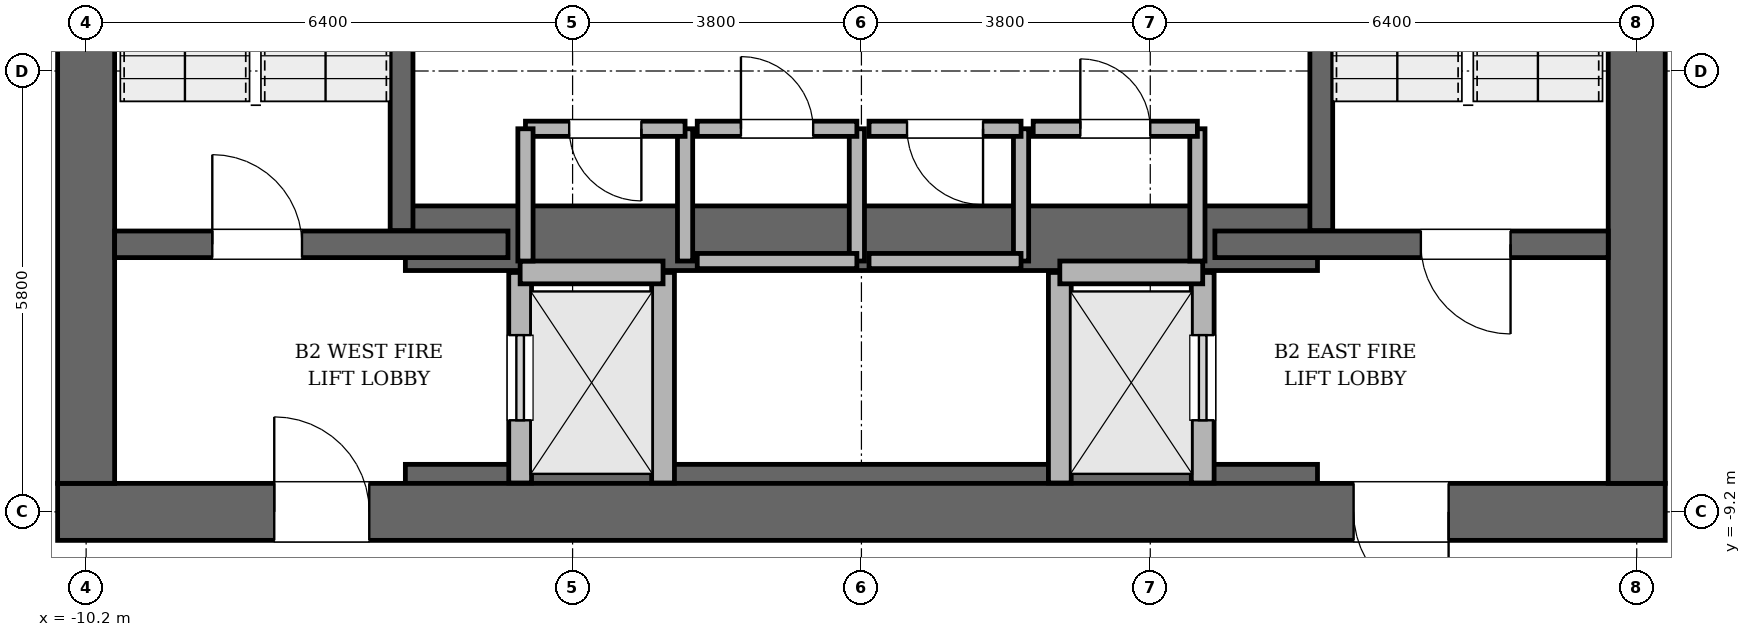
"""IFC4 building model, lengths in metres.
Left out: names, types, materials, properties, quantities, classifications, styles, units other than length and angle.
Written with IfcOpenShell. Run it as: python <this file> out.ifc"""

import sys

from ifc_helpers import new_model, si_unit, direction, frame, frame_2d, origin, place, context, subcontext, project, spatial, rectangle, extrude, element, fill, save


model = new_model("IFC4")
c1 = context("Model", 3, precision=1e-05, world=origin(), true_north=direction((0.0, 1.0)))
c2 = subcontext(c1, "Body", "Model", "MODEL_VIEW")
j1 = project(units=[si_unit("LENGTHUNIT", "METRE"), si_unit("PLANEANGLEUNIT", "RADIAN")], contexts=[c1])
p1 = place(None, origin())
s1 = spatial("IfcSite", under=j1, at=p1, CompositionType="ELEMENT")
p2 = place(p1, origin())
s2 = spatial("IfcBuilding", under=s1, at=p2, CompositionType="ELEMENT")
p3 = place(p2, frame((0.0, 0.0, -9.6)))
s3 = spatial("IfcBuildingStorey", under=s2, at=p3, CompositionType="ELEMENT", Elevation=-9.6)
for number, where, z_axis, x_axis in (
    (1, (-6.0, -9.0, -1.6), (0.0, 0.0, 1.0), (1.0, 0.0, 0.0)),
    (2, (-6.0, -5.6, -1.6), (0.0, 0.0, 1.0), (1.0, 0.0, 0.0)),
):
    element("IfcWall", number, at=place(p3, frame(where, z_axis=z_axis, x_axis=x_axis)), inside=s3, PredefinedType="USERDEFINED", context=c2, shape_type="SweptSolid", body=[
        extrude(rectangle(XDim=12.0, YDim=0.85, at=frame_2d((6.0, 0.0))), origin(), (0.0, 0.0, 1.0), 1.6),
    ])
p4 = place(p3, frame((10.575, -9.2, 0.0), z_axis=(0.0, 0.0, 1.0), x_axis=(-1.0, 0.0, 0.0)))
e3 = element("IfcWall", 3, at=p4, inside=s3, PredefinedType="SHEAR", context=c2, shape_type="SweptSolid", body=[
    extrude(rectangle(XDim=21.15, YDim=0.75, at=frame_2d((10.575, 0.0))), origin(), (0.0, 0.0, 1.0), 4.8),
])
p5 = place(p4, frame((2.85, 0.0, 0.0)))
e4 = element("IfcOpeningElement", 4, at=p5, cuts=e3, PredefinedType="OPENING", context=c2, shape_type="SweptSolid", body=[
    extrude(rectangle(XDim=1.25, YDim=2.25, at=frame_2d((0.625, 1.125))), frame((0.0, 0.385, 0.0), z_axis=(0.0, -1.0, 0.0), x_axis=(1.0, 0.0, 0.0)), (0.0, 0.0, 1.0), 0.77),
])
p6 = place(p4, frame((17.05, 0.0, 0.0)))
e5 = element("IfcOpeningElement", 5, at=p6, cuts=e3, PredefinedType="OPENING", context=c2, shape_type="SweptSolid", body=[
    extrude(rectangle(XDim=1.25, YDim=2.25, at=frame_2d((0.625, 1.125))), frame((0.0, 0.385, 0.0), z_axis=(0.0, -1.0, 0.0), x_axis=(1.0, 0.0, 0.0)), (0.0, 0.0, 1.0), 0.77),
])
p7 = place(p3, frame((-10.2, -8.825, 0.0), z_axis=(0.0, 0.0, 1.0), x_axis=(0.0, 1.0, 0.0)))
e6 = element("IfcWall", 6, at=p7, inside=s3, PredefinedType="SHEAR", context=c2, shape_type="SweptSolid", body=[
    extrude(rectangle(XDim=17.65, YDim=0.75, at=frame_2d((8.825, 0.0))), origin(), (0.0, 0.0, 1.0), 4.8),
])
p8 = place(p7, frame((12.615, 0.0, 0.0)))
e7 = element("IfcOpeningElement", 7, at=p8, cuts=e6, PredefinedType="OPENING", context=c2, shape_type="SweptSolid", body=[
    extrude(rectangle(XDim=1.18, YDim=2.2, at=frame_2d((0.59, 1.1))), frame((0.0, 0.385, 0.0), z_axis=(0.0, -1.0, 0.0), x_axis=(1.0, 0.0, 0.0)), (0.0, 0.0, 1.0), 0.77),
])
p9 = place(p3, frame((10.2, 8.825, 0.0), z_axis=(0.0, 0.0, 1.0), x_axis=(0.0, -1.0, 0.0)))
e8 = element("IfcWall", 8, at=p9, inside=s3, PredefinedType="SHEAR", context=c2, shape_type="SweptSolid", body=[
    extrude(rectangle(XDim=17.65, YDim=0.75, at=frame_2d((8.825, 0.0))), origin(), (0.0, 0.0, 1.0), 4.8),
])
p10 = place(p9, frame((3.855, 0.0, 0.0)))
e9 = element("IfcOpeningElement", 9, at=p10, cuts=e8, PredefinedType="OPENING", context=c2, shape_type="SweptSolid", body=[
    extrude(rectangle(XDim=1.18, YDim=2.2, at=frame_2d((0.59, 1.1))), frame((0.0, 0.385, 0.0), z_axis=(0.0, -1.0, 0.0), x_axis=(1.0, 0.0, 0.0)), (0.0, 0.0, 1.0), 0.77),
])
for number, where, z_axis, x_axis in (
    (10, (-6.05, -5.5, 0.0), (0.0, 0.0, 1.0), (0.0, 1.0, 0.0)),
    (11, (6.05, 3.45, 0.0), (0.0, 0.0, 1.0), (0.0, -1.0, 0.0)),
):
    element("IfcWall", number, at=place(p3, frame(where, z_axis=z_axis, x_axis=x_axis)), inside=s3, PredefinedType="SOLIDWALL", context=c2, shape_type="SweptSolid", body=[
        extrude(rectangle(XDim=8.95, YDim=0.3, at=frame_2d((4.475, 0.0))), origin(), (0.0, 0.0, 1.0), 4.8),
    ])
p11 = place(p3, frame((-9.825, -5.68, 0.0), z_axis=(0.0, 0.0, 1.0), x_axis=(1.0, 0.0, 0.0)))
e12 = element("IfcWall", 12, at=p11, inside=s3, PredefinedType="SOLIDWALL", context=c2, shape_type="SweptSolid", body=[
    extrude(rectangle(XDim=5.175, YDim=0.35, at=frame_2d((2.587, 0.0))), origin(), (0.0, 0.0, 1.0), 4.8),
])
p12 = place(p11, frame((1.285, 0.0, 0.0)))
e13 = element("IfcOpeningElement", 13, at=p12, cuts=e12, PredefinedType="OPENING", context=c2, shape_type="SweptSolid", body=[
    extrude(rectangle(XDim=1.18, YDim=2.2, at=frame_2d((0.59, 1.1))), frame((0.0, 0.185, 0.0), z_axis=(0.0, -1.0, 0.0), x_axis=(1.0, 0.0, 0.0)), (0.0, 0.0, 1.0), 0.37),
])
p13 = place(p3, frame((4.65, -5.68, 0.0), z_axis=(0.0, 0.0, 1.0), x_axis=(1.0, 0.0, 0.0)))
e14 = element("IfcWall", 14, at=p13, inside=s3, PredefinedType="SOLIDWALL", context=c2, shape_type="SweptSolid", body=[
    extrude(rectangle(XDim=5.175, YDim=0.35, at=frame_2d((2.587, 0.0))), origin(), (0.0, 0.0, 1.0), 4.8),
])
p14 = place(p13, frame((2.71, 0.0, 0.0)))
e15 = element("IfcOpeningElement", 15, at=p14, cuts=e14, PredefinedType="OPENING", context=c2, shape_type="SweptSolid", body=[
    extrude(rectangle(XDim=1.18, YDim=2.2, at=frame_2d((0.59, 1.1))), frame((0.0, 0.185, 0.0), z_axis=(0.0, -1.0, 0.0), x_axis=(1.0, 0.0, 0.0)), (0.0, 0.0, 1.0), 0.37),
])
p15 = place(p3, frame((-4.49, -8.82, 0.0), z_axis=(0.0, 0.0, 1.0), x_axis=(0.0, 1.0, 0.0)))
e16 = element("IfcWall", 16, at=p15, inside=s3, PredefinedType="SOLIDWALL", context=c2, shape_type="SweptSolid", body=[
    extrude(rectangle(XDim=2.77, YDim=0.3, at=frame_2d((1.385, 0.0))), origin(), (0.0, 0.0, 1.0), 4.52),
])
p16 = place(p15, frame((0.825, 0.0, 0.0)))
e17 = element("IfcOpeningElement", 17, at=p16, cuts=e16, PredefinedType="OPENING", context=c2, shape_type="SweptSolid", body=[
    extrude(rectangle(XDim=1.12, YDim=2.25, at=frame_2d((0.56, 1.125))), frame((0.0, 0.16, 0.0), z_axis=(0.0, -1.0, 0.0), x_axis=(1.0, 0.0, 0.0)), (0.0, 0.0, 1.0), 0.32),
])
p17 = place(p3, frame((-2.61, -8.82, 0.0), z_axis=(0.0, 0.0, 1.0), x_axis=(0.0, 1.0, 0.0)))
e18 = element("IfcWall", 18, at=p17, inside=s3, PredefinedType="SOLIDWALL", context=c2, shape_type="SweptSolid", body=[
    extrude(rectangle(XDim=2.77, YDim=0.3, at=frame_2d((1.385, 0.0))), origin(), (0.0, 0.0, 1.0), 4.52),
])
p18 = place(p3, frame((-4.49, -6.05, 0.0), z_axis=(0.0, 0.0, 1.0), x_axis=(1.0, 0.0, 0.0)))
e19 = element("IfcWall", 19, at=p18, inside=s3, PredefinedType="SOLIDWALL", context=c2, shape_type="SweptSolid", body=[
    extrude(rectangle(XDim=1.88, YDim=0.3, at=frame_2d((0.94, 0.0))), origin(), (0.0, 0.0, 1.0), 4.52),
])
p19 = place(p3, frame((4.49, -8.82, 0.0), z_axis=(0.0, 0.0, 1.0), x_axis=(0.0, 1.0, 0.0)))
e20 = element("IfcWall", 20, at=p19, inside=s3, PredefinedType="SOLIDWALL", context=c2, shape_type="SweptSolid", body=[
    extrude(rectangle(XDim=2.77, YDim=0.3, at=frame_2d((1.385, 0.0))), origin(), (0.0, 0.0, 1.0), 4.52),
])
p20 = place(p19, frame((0.825, 0.0, 0.0)))
e21 = element("IfcOpeningElement", 21, at=p20, cuts=e20, PredefinedType="OPENING", context=c2, shape_type="SweptSolid", body=[
    extrude(rectangle(XDim=1.12, YDim=2.25, at=frame_2d((0.56, 1.125))), frame((0.0, 0.16, 0.0), z_axis=(0.0, -1.0, 0.0), x_axis=(1.0, 0.0, 0.0)), (0.0, 0.0, 1.0), 0.32),
])
p21 = place(p3, frame((2.61, -8.82, 0.0), z_axis=(0.0, 0.0, 1.0), x_axis=(0.0, 1.0, 0.0)))
e22 = element("IfcWall", 22, at=p21, inside=s3, PredefinedType="SOLIDWALL", context=c2, shape_type="SweptSolid", body=[
    extrude(rectangle(XDim=2.77, YDim=0.3, at=frame_2d((1.385, 0.0))), origin(), (0.0, 0.0, 1.0), 4.52),
])
p22 = place(p3, frame((2.61, -6.05, 0.0), z_axis=(0.0, 0.0, 1.0), x_axis=(1.0, 0.0, 0.0)))
e23 = element("IfcWall", 23, at=p22, inside=s3, PredefinedType="SOLIDWALL", context=c2, shape_type="SweptSolid", body=[
    extrude(rectangle(XDim=1.88, YDim=0.3, at=frame_2d((0.94, 0.0))), origin(), (0.0, 0.0, 1.0), 4.52),
])
p23 = place(p3, frame((-2.32, -5.9, 0.0), z_axis=(0.0, 0.0, 1.0), x_axis=(0.0, 1.0, 0.0)))
e24 = element("IfcWall", 24, at=p23, inside=s3, PredefinedType="SOLIDWALL", context=c2, shape_type="SweptSolid", body=[
    extrude(rectangle(XDim=1.74, YDim=0.2, at=frame_2d((0.87, 0.0))), origin(), (0.0, 0.0, 1.0), 4.52),
])
p24 = place(p3, frame((-2.32, -4.16, 0.0), z_axis=(0.0, 0.0, 1.0), x_axis=(-1.0, 0.0, 0.0)))
e25 = element("IfcWall", 25, at=p24, inside=s3, PredefinedType="SOLIDWALL", context=c2, shape_type="SweptSolid", body=[
    extrude(rectangle(XDim=2.1, YDim=0.2, at=frame_2d((1.05, 0.0))), origin(), (0.0, 0.0, 1.0), 4.52),
])
p25 = place(p24, frame((0.575, 0.0, 0.0)))
e26 = element("IfcOpeningElement", 26, at=p25, cuts=e25, PredefinedType="OPENING", context=c2, shape_type="SweptSolid", body=[
    extrude(rectangle(XDim=0.95, YDim=2.15, at=frame_2d((0.475, 1.075))), frame((0.0, 0.11, 0.0), z_axis=(0.0, -1.0, 0.0), x_axis=(1.0, 0.0, 0.0)), (0.0, 0.0, 1.0), 0.22),
])
for number, where, z_axis, x_axis in (
    (27, (-4.42, -4.16, 0.0), (0.0, 0.0, 1.0), (0.0, -1.0, 0.0)),
    (28, (-0.06, -5.9, 0.0), (0.0, 0.0, 1.0), (0.0, 1.0, 0.0)),
):
    element("IfcWall", number, at=place(p3, frame(where, z_axis=z_axis, x_axis=x_axis)), inside=s3, PredefinedType="SOLIDWALL", context=c2, shape_type="SweptSolid", body=[
        extrude(rectangle(XDim=1.74, YDim=0.2, at=frame_2d((0.87, 0.0))), origin(), (0.0, 0.0, 1.0), 4.52),
    ])
p26 = place(p3, frame((-0.06, -4.16, 0.0), z_axis=(0.0, 0.0, 1.0), x_axis=(-1.0, 0.0, 0.0)))
e29 = element("IfcWall", 29, at=p26, inside=s3, PredefinedType="SOLIDWALL", context=c2, shape_type="SweptSolid", body=[
    extrude(rectangle(XDim=2.1, YDim=0.2, at=frame_2d((1.05, 0.0))), origin(), (0.0, 0.0, 1.0), 4.52),
])
p27 = place(p26, frame((0.575, 0.0, 0.0)))
e30 = element("IfcOpeningElement", 30, at=p27, cuts=e29, PredefinedType="OPENING", context=c2, shape_type="SweptSolid", body=[
    extrude(rectangle(XDim=0.95, YDim=2.15, at=frame_2d((0.475, 1.075))), frame((0.0, 0.11, 0.0), z_axis=(0.0, -1.0, 0.0), x_axis=(1.0, 0.0, 0.0)), (0.0, 0.0, 1.0), 0.22),
])
p28 = place(p3, frame((-2.16, -5.9, 0.0), z_axis=(0.0, 0.0, 1.0), x_axis=(1.0, 0.0, 0.0)))
e31 = element("IfcWall", 31, at=p28, inside=s3, PredefinedType="SOLIDWALL", context=c2, shape_type="SweptSolid", body=[
    extrude(rectangle(XDim=2.1, YDim=0.2, at=frame_2d((1.05, 0.0))), origin(), (0.0, 0.0, 1.0), 4.52),
])
p29 = place(p3, frame((2.1, -5.9, 0.0), z_axis=(0.0, 0.0, 1.0), x_axis=(0.0, 1.0, 0.0)))
e32 = element("IfcWall", 32, at=p29, inside=s3, PredefinedType="SOLIDWALL", context=c2, shape_type="SweptSolid", body=[
    extrude(rectangle(XDim=1.74, YDim=0.2, at=frame_2d((0.87, 0.0))), origin(), (0.0, 0.0, 1.0), 4.52),
])
p30 = place(p3, frame((2.1, -4.16, 0.0), z_axis=(0.0, 0.0, 1.0), x_axis=(-1.0, 0.0, 0.0)))
e33 = element("IfcWall", 33, at=p30, inside=s3, PredefinedType="SOLIDWALL", context=c2, shape_type="SweptSolid", body=[
    extrude(rectangle(XDim=2.0, YDim=0.2, at=frame_2d((1.0, 0.0))), origin(), (0.0, 0.0, 1.0), 4.52),
])
p31 = place(p30, frame((0.5, 0.0, 0.0)))
e34 = element("IfcOpeningElement", 34, at=p31, cuts=e33, PredefinedType="OPENING", context=c2, shape_type="SweptSolid", body=[
    extrude(rectangle(XDim=1.0, YDim=2.15, at=frame_2d((0.5, 1.075))), frame((0.0, 0.11, 0.0), z_axis=(0.0, -1.0, 0.0), x_axis=(1.0, 0.0, 0.0)), (0.0, 0.0, 1.0), 0.22),
])
p32 = place(p3, frame((0.1, -5.9, 0.0), z_axis=(0.0, 0.0, 1.0), x_axis=(1.0, 0.0, 0.0)))
e35 = element("IfcWall", 35, at=p32, inside=s3, PredefinedType="SOLIDWALL", context=c2, shape_type="SweptSolid", body=[
    extrude(rectangle(XDim=2.0, YDim=0.2, at=frame_2d((1.0, 0.0))), origin(), (0.0, 0.0, 1.0), 4.52),
])
p33 = place(p3, frame((4.42, -5.9, 0.0), z_axis=(0.0, 0.0, 1.0), x_axis=(0.0, 1.0, 0.0)))
e36 = element("IfcWall", 36, at=p33, inside=s3, PredefinedType="SOLIDWALL", context=c2, shape_type="SweptSolid", body=[
    extrude(rectangle(XDim=1.74, YDim=0.2, at=frame_2d((0.87, 0.0))), origin(), (0.0, 0.0, 1.0), 4.52),
])
p34 = place(p3, frame((4.42, -4.16, 0.0), z_axis=(0.0, 0.0, 1.0), x_axis=(-1.0, 0.0, 0.0)))
e37 = element("IfcWall", 37, at=p34, inside=s3, PredefinedType="SOLIDWALL", context=c2, shape_type="SweptSolid", body=[
    extrude(rectangle(XDim=2.16, YDim=0.2, at=frame_2d((1.08, 0.0))), origin(), (0.0, 0.0, 1.0), 4.52),
])
p35 = place(p34, frame((0.62, 0.0, 0.0)))
e38 = element("IfcOpeningElement", 38, at=p35, cuts=e37, PredefinedType="OPENING", context=c2, shape_type="SweptSolid", body=[
    extrude(rectangle(XDim=0.92, YDim=2.1, at=frame_2d((0.46, 1.05))), frame((0.0, 0.11, 0.0), z_axis=(0.0, -1.0, 0.0), x_axis=(1.0, 0.0, 0.0)), (0.0, 0.0, 1.0), 0.22),
])
p36 = place(p12, origin())
e39 = element("IfcDoor", 39, at=p36, inside=s3, OperationType="SINGLE_SWING_LEFT", PredefinedType="DOOR", context=c2, shape_type="SweptSolid", body=[
    extrude(rectangle(XDim=1.18, YDim=2.2, at=frame_2d((0.59, 1.1))), frame((0.0, 0.025, 0.0), z_axis=(0.0, -1.0, 0.0), x_axis=(1.0, 0.0, 0.0)), (0.0, 0.0, 1.0), 0.05),
])
fill(e13, e39)
p37 = place(p14, origin())
e40 = element("IfcDoor", 40, at=p37, inside=s3, OperationType="SINGLE_SWING_RIGHT", PredefinedType="DOOR", context=c2, shape_type="SweptSolid", body=[
    extrude(rectangle(XDim=1.18, YDim=2.2, at=frame_2d((0.59, 1.1))), frame((0.0, 0.025, 0.0), z_axis=(0.0, -1.0, 0.0), x_axis=(1.0, 0.0, 0.0)), (0.0, 0.0, 1.0), 0.05),
])
fill(e15, e40)
p38 = place(p5, origin())
e41 = element("IfcDoor", 41, at=p38, inside=s3, OperationType="SINGLE_SWING_LEFT", PredefinedType="DOOR", context=c2, shape_type="SweptSolid", body=[
    extrude(rectangle(XDim=1.25, YDim=2.25, at=frame_2d((0.625, 1.125))), frame((0.0, 0.025, 0.0), z_axis=(0.0, -1.0, 0.0), x_axis=(1.0, 0.0, 0.0)), (0.0, 0.0, 1.0), 0.05),
])
fill(e4, e41)
p39 = place(p6, origin())
e42 = element("IfcDoor", 42, at=p39, inside=s3, OperationType="SINGLE_SWING_RIGHT", PredefinedType="DOOR", context=c2, shape_type="SweptSolid", body=[
    extrude(rectangle(XDim=1.25, YDim=2.25, at=frame_2d((0.625, 1.125))), frame((0.0, 0.025, 0.0), z_axis=(0.0, -1.0, 0.0), x_axis=(1.0, 0.0, 0.0)), (0.0, 0.0, 1.0), 0.05),
])
fill(e5, e42)
p40 = place(p16, origin())
e43 = element("IfcDoor", 43, at=p40, inside=s3, OperationType="SLIDING_TO_LEFT", PredefinedType="DOOR", context=c2, shape_type="SweptSolid", body=[
    extrude(rectangle(XDim=1.12, YDim=2.25, at=frame_2d((0.56, 1.125))), frame((0.0, 0.025, 0.0), z_axis=(0.0, -1.0, 0.0), x_axis=(1.0, 0.0, 0.0)), (0.0, 0.0, 1.0), 0.05),
])
fill(e17, e43)
p41 = place(p20, origin())
e44 = element("IfcDoor", 44, at=p41, inside=s3, OperationType="SLIDING_TO_RIGHT", PredefinedType="DOOR", context=c2, shape_type="SweptSolid", body=[
    extrude(rectangle(XDim=1.12, YDim=2.25, at=frame_2d((0.56, 1.125))), frame((0.0, 0.025, 0.0), z_axis=(0.0, -1.0, 0.0), x_axis=(1.0, 0.0, 0.0)), (0.0, 0.0, 1.0), 0.05),
])
fill(e21, e44)
p42 = place(p25, origin())
e45 = element("IfcDoor", 45, at=p42, inside=s3, OperationType="SINGLE_SWING_LEFT", PredefinedType="DOOR", context=c2, shape_type="SweptSolid", body=[
    extrude(rectangle(XDim=0.95, YDim=2.15, at=frame_2d((0.475, 1.075))), frame((0.0, 0.025, 0.0), z_axis=(0.0, -1.0, 0.0), x_axis=(1.0, 0.0, 0.0)), (0.0, 0.0, 1.0), 0.05),
])
fill(e26, e45)
p43 = place(p27, origin())
e46 = element("IfcDoor", 46, at=p43, inside=s3, OperationType="SINGLE_SWING_RIGHT", PredefinedType="DOOR", context=c2, shape_type="SweptSolid", body=[
    extrude(rectangle(XDim=0.95, YDim=2.15, at=frame_2d((0.475, 1.075))), frame((0.0, 0.025, 0.0), z_axis=(0.0, -1.0, 0.0), x_axis=(1.0, 0.0, 0.0)), (0.0, 0.0, 1.0), 0.05),
])
fill(e30, e46)
p44 = place(p31, origin())
e47 = element("IfcDoor", 47, at=p44, inside=s3, OperationType="SINGLE_SWING_LEFT", PredefinedType="DOOR", context=c2, shape_type="SweptSolid", body=[
    extrude(rectangle(XDim=1.0, YDim=2.15, at=frame_2d((0.5, 1.075))), frame((0.0, 0.025, 0.0), z_axis=(0.0, -1.0, 0.0), x_axis=(1.0, 0.0, 0.0)), (0.0, 0.0, 1.0), 0.05),
])
fill(e34, e47)
p45 = place(p35, origin())
e48 = element("IfcDoor", 48, at=p45, inside=s3, OperationType="SINGLE_SWING_RIGHT", PredefinedType="DOOR", context=c2, shape_type="SweptSolid", body=[
    extrude(rectangle(XDim=0.92, YDim=2.1, at=frame_2d((0.46, 1.05))), frame((0.0, 0.025, 0.0), z_axis=(0.0, -1.0, 0.0), x_axis=(1.0, 0.0, 0.0)), (0.0, 0.0, 1.0), 0.05),
])
fill(e38, e48)
save(model, sys.argv[1])
